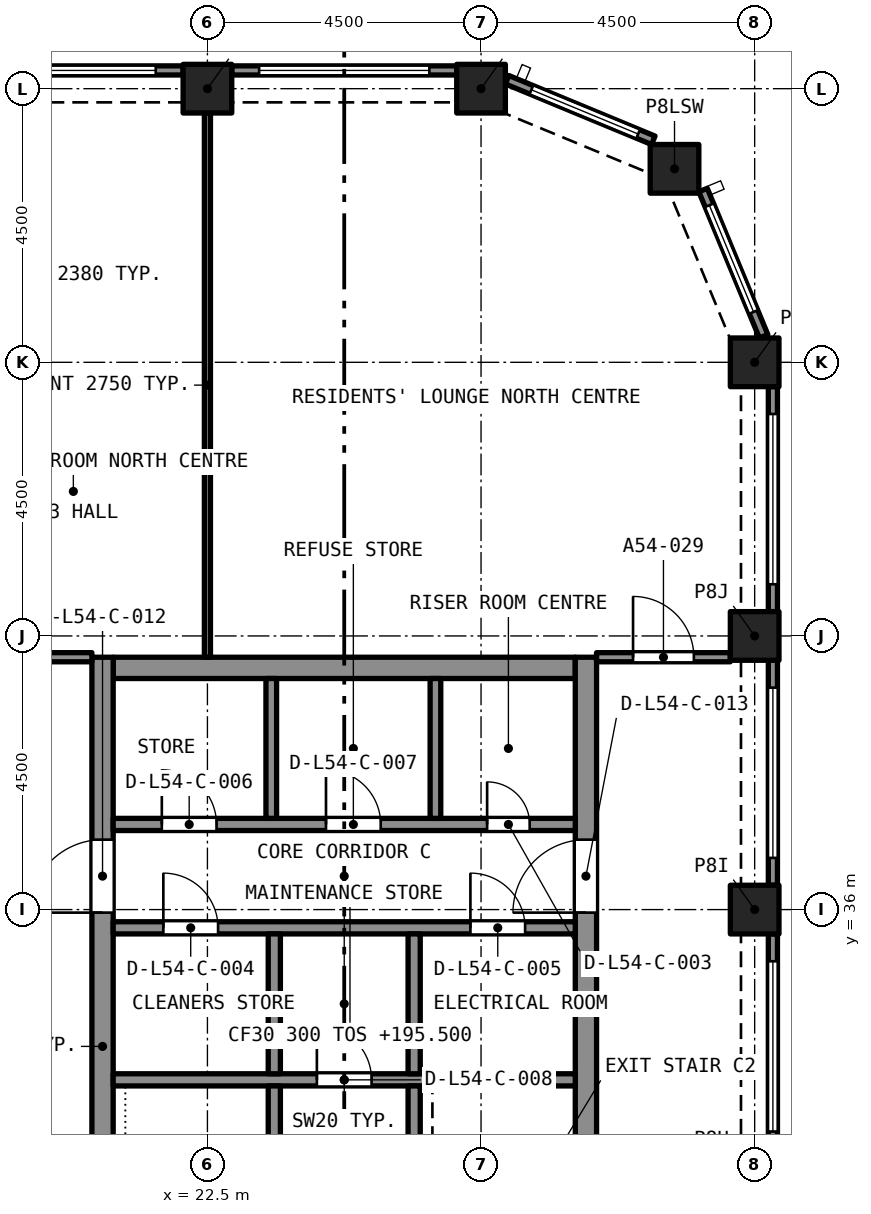
"""IFC4 building model, lengths in metres.
Left out: names, types, materials, properties, quantities, classifications, styles, units other than length and angle.
Written with IfcOpenShell. Run it as: python <this file> out.ifc"""

import sys

from ifc_helpers import new_model, si_unit, direction, frame, frame_2d, origin, origin_2d, place, context, subcontext, project, spatial, rectangle, extrude, element, fill, save


model = new_model("IFC4")
c1 = context("Model", 3, precision=1e-05, world=origin(), true_north=direction((0.0, 1.0)))
c2 = subcontext(c1, "Body", "Model", "MODEL_VIEW")
j1 = project(units=[si_unit("LENGTHUNIT", "METRE"), si_unit("PLANEANGLEUNIT", "RADIAN")], contexts=[c1])
p1 = place(None, origin())
s1 = spatial("IfcSite", under=j1, at=p1, CompositionType="ELEMENT")
p2 = place(p1, origin())
s2 = spatial("IfcBuilding", under=s1, at=p2, CompositionType="ELEMENT")
p3 = place(p2, frame((0.0, 0.0, 195.5)))
s3 = spatial("IfcBuildingStorey", under=s2, at=p3, CompositionType="ELEMENT", Elevation=195.5)
for number, where, z_axis, x_axis in (
    (1, (31.5, 36.0, 0.0), (0.0, 0.0, 1.0), (1.0, 0.0, 0.0)),
    (2, (31.5, 40.5, 0.0), (0.0, 0.0, 1.0), (1.0, 0.0, 0.0)),
    (3, (31.5, 45.0, 0.0), (0.0, 0.0, 1.0), (1.0, 0.0, 0.0)),
    (4, (30.182, 48.182, 0.0), (0.0, 0.0, 1.0), (1.0, 0.0, 0.0)),
    (5, (22.5, 49.5, 0.0), (0.0, 0.0, 1.0), (1.0, 0.0, 0.0)),
    (6, (27.0, 49.5, 0.0), (0.0, 0.0, 1.0), (1.0, 0.0, 0.0)),
):
    element("IfcColumn", number, at=place(p3, frame(where, z_axis=z_axis, x_axis=x_axis)), inside=s3, PredefinedType="COLUMN", context=c2, shape_type="SweptSolid", body=[
        extrude(rectangle(XDim=0.8, YDim=0.8, at=origin_2d()), origin(), (0.0, 0.0, 1.0), 3.2),
    ])
p4 = place(p3, frame((20.95, 39.975, 0.0), z_axis=(0.0, 0.0, 1.0), x_axis=(1.0, 0.0, 0.0)))
e7 = element("IfcWall", 7, at=p4, inside=s3, PredefinedType="SOLIDWALL", context=c2, shape_type="SweptSolid", body=[
    extrude(rectangle(XDim=7.6, YDim=0.35, at=frame_2d((3.8, 0.0))), origin(), (0.0, 0.0, 1.0), 3.2),
])
p5 = place(p3, frame((20.775, 27.35, 0.0), z_axis=(0.0, 0.0, 1.0), x_axis=(0.0, 1.0, 0.0)))
e8 = element("IfcWall", 8, at=p5, inside=s3, PredefinedType="SOLIDWALL", context=c2, shape_type="SweptSolid", body=[
    extrude(rectangle(XDim=12.8, YDim=0.35, at=frame_2d((6.4, 0.0))), origin(), (0.0, 0.0, 1.0), 3.2),
])
p6 = place(p5, frame((8.6, 0.0, 0.0)))
e9 = element("IfcOpeningElement", 9, at=p6, cuts=e8, PredefinedType="OPENING", context=c2, shape_type="SweptSolid", body=[
    extrude(rectangle(XDim=1.2, YDim=2.1, at=frame_2d((0.6, 1.05))), frame((0.0, 0.185, 0.0), z_axis=(0.0, -1.0, 0.0), x_axis=(1.0, 0.0, 0.0)), (0.0, 0.0, 1.0), 0.37),
])
p7 = place(p3, frame((28.725, 27.35, 0.0), z_axis=(0.0, 0.0, 1.0), x_axis=(0.0, 1.0, 0.0)))
e10 = element("IfcWall", 10, at=p7, inside=s3, PredefinedType="SOLIDWALL", context=c2, shape_type="SweptSolid", body=[
    extrude(rectangle(XDim=12.8, YDim=0.35, at=frame_2d((6.4, 0.0))), origin(), (0.0, 0.0, 1.0), 3.2),
])
p8 = place(p7, frame((8.6, 0.0, 0.0)))
e11 = element("IfcOpeningElement", 11, at=p8, cuts=e10, PredefinedType="OPENING", context=c2, shape_type="SweptSolid", body=[
    extrude(rectangle(XDim=1.2, YDim=2.1, at=frame_2d((0.6, 1.05))), frame((0.0, 0.185, 0.0), z_axis=(0.0, -1.0, 0.0), x_axis=(1.0, 0.0, 0.0)), (0.0, 0.0, 1.0), 0.37),
])
p9 = place(p3, frame((31.8, 35.6, 0.0), z_axis=(0.0, 0.0, 1.0), x_axis=(0.0, -1.0, 0.0)))
e12 = element("IfcWall", 12, at=p9, inside=s3, PredefinedType="SOLIDWALL", context=c2, shape_type="SweptSolid", body=[
    extrude(rectangle(XDim=3.7, YDim=0.15, at=frame_2d((1.85, 0.0))), origin(), (0.0, 0.0, 1.0), 3.2),
])
p10 = place(p9, frame((0.45, 0.0, 0.45)))
e13 = element("IfcOpeningElement", 13, at=p10, cuts=e12, PredefinedType="OPENING", context=c2, shape_type="SweptSolid", body=[
    extrude(rectangle(XDim=2.8, YDim=1.95, at=frame_2d((1.4, 0.975))), frame((0.0, 0.085, 0.0), z_axis=(0.0, -1.0, 0.0), x_axis=(1.0, 0.0, 0.0)), (0.0, 0.0, 1.0), 0.17),
])
p11 = place(p3, frame((31.8, 40.1, 0.0), z_axis=(0.0, 0.0, 1.0), x_axis=(0.0, -1.0, 0.0)))
e14 = element("IfcWall", 14, at=p11, inside=s3, PredefinedType="SOLIDWALL", context=c2, shape_type="SweptSolid", body=[
    extrude(rectangle(XDim=3.7, YDim=0.15, at=frame_2d((1.85, 0.0))), origin(), (0.0, 0.0, 1.0), 3.2),
])
p12 = place(p11, frame((0.45, 0.0, 0.45)))
e15 = element("IfcOpeningElement", 15, at=p12, cuts=e14, PredefinedType="OPENING", context=c2, shape_type="SweptSolid", body=[
    extrude(rectangle(XDim=2.8, YDim=1.95, at=frame_2d((1.4, 0.975))), frame((0.0, 0.085, 0.0), z_axis=(0.0, -1.0, 0.0), x_axis=(1.0, 0.0, 0.0)), (0.0, 0.0, 1.0), 0.17),
])
p13 = place(p3, frame((31.8, 44.6, 0.0), z_axis=(0.0, 0.0, 1.0), x_axis=(0.0, -1.0, 0.0)))
e16 = element("IfcWall", 16, at=p13, inside=s3, PredefinedType="SOLIDWALL", context=c2, shape_type="SweptSolid", body=[
    extrude(rectangle(XDim=3.7, YDim=0.15, at=frame_2d((1.85, 0.0))), origin(), (0.0, 0.0, 1.0), 3.2),
])
p14 = place(p13, frame((0.45, 0.0, 0.45)))
e17 = element("IfcOpeningElement", 17, at=p14, cuts=e16, PredefinedType="OPENING", context=c2, shape_type="SweptSolid", body=[
    extrude(rectangle(XDim=2.8, YDim=1.95, at=frame_2d((1.4, 0.975))), frame((0.0, 0.085, 0.0), z_axis=(0.0, -1.0, 0.0), x_axis=(1.0, 0.0, 0.0)), (0.0, 0.0, 1.0), 0.17),
])
p15 = place(p3, frame((30.651, 47.833, 0.0), z_axis=(0.0, 0.0, 1.0), x_axis=(0.382669406082, -0.923885342263, 0.0)))
e18 = element("IfcWall", 18, at=p15, inside=s3, PredefinedType="SOLIDWALL", context=c2, shape_type="SweptSolid", body=[
    extrude(rectangle(XDim=2.602, YDim=0.15, at=frame_2d((1.301, 0.0))), origin(), (0.0, 0.0, 1.0), 3.2),
])
p16 = place(p15, frame((0.27, 0.0, 0.45)))
e19 = element("IfcOpeningElement", 19, at=p16, cuts=e18, PredefinedType="OPENING", context=c2, shape_type="SweptSolid", body=[
    extrude(rectangle(XDim=1.9, YDim=1.95, at=frame_2d((0.95, 0.975))), frame((0.0, 0.085, 0.0), z_axis=(0.0, -1.0, 0.0), x_axis=(1.0, 0.0, 0.0)), (0.0, 0.0, 1.0), 0.17),
])
p17 = place(p3, frame((27.429, 49.647, 0.0), z_axis=(0.0, 0.0, 1.0), x_axis=(0.923885342263, -0.382669406082, 0.0)))
e20 = element("IfcWall", 20, at=p17, inside=s3, PredefinedType="SOLIDWALL", context=c2, shape_type="SweptSolid", body=[
    extrude(rectangle(XDim=2.602, YDim=0.15, at=frame_2d((1.301, 0.0))), origin(), (0.0, 0.0, 1.0), 3.2),
])
p18 = place(p17, frame((0.432, 0.0, 0.45)))
e21 = element("IfcOpeningElement", 21, at=p18, cuts=e20, PredefinedType="OPENING", context=c2, shape_type="SweptSolid", body=[
    extrude(rectangle(XDim=1.9, YDim=1.95, at=frame_2d((0.95, 0.975))), frame((0.0, 0.085, 0.0), z_axis=(0.0, -1.0, 0.0), x_axis=(1.0, 0.0, 0.0)), (0.0, 0.0, 1.0), 0.17),
])
p19 = place(p3, frame((22.9, 49.8, 0.0), z_axis=(0.0, 0.0, 1.0), x_axis=(1.0, 0.0, 0.0)))
e22 = element("IfcWall", 22, at=p19, inside=s3, PredefinedType="SOLIDWALL", context=c2, shape_type="SweptSolid", body=[
    extrude(rectangle(XDim=3.7, YDim=0.15, at=frame_2d((1.85, 0.0))), origin(), (0.0, 0.0, 1.0), 3.2),
])
p20 = place(p19, frame((0.45, 0.0, 0.45)))
e23 = element("IfcOpeningElement", 23, at=p20, cuts=e22, PredefinedType="OPENING", context=c2, shape_type="SweptSolid", body=[
    extrude(rectangle(XDim=2.8, YDim=1.95, at=frame_2d((1.4, 0.975))), frame((0.0, 0.085, 0.0), z_axis=(0.0, -1.0, 0.0), x_axis=(1.0, 0.0, 0.0)), (0.0, 0.0, 1.0), 0.17),
])
p21 = place(p3, frame((18.4, 49.8, 0.0), z_axis=(0.0, 0.0, 1.0), x_axis=(1.0, 0.0, 0.0)))
e24 = element("IfcWall", 24, at=p21, inside=s3, PredefinedType="SOLIDWALL", context=c2, shape_type="SweptSolid", body=[
    extrude(rectangle(XDim=3.7, YDim=0.15, at=frame_2d((1.85, 0.0))), origin(), (0.0, 0.0, 1.0), 3.2),
])
p22 = place(p21, frame((0.45, 0.0, 0.45)))
e25 = element("IfcOpeningElement", 25, at=p22, cuts=e24, PredefinedType="OPENING", context=c2, shape_type="SweptSolid", body=[
    extrude(rectangle(XDim=2.8, YDim=1.95, at=frame_2d((1.4, 0.975))), frame((0.0, 0.085, 0.0), z_axis=(0.0, -1.0, 0.0), x_axis=(1.0, 0.0, 0.0)), (0.0, 0.0, 1.0), 0.17),
])
p23 = place(p3, frame((18.4, 40.15, 0.0), z_axis=(0.0, 0.0, 1.0), x_axis=(1.0, 0.0, 0.0)))
e26 = element("IfcWall", 26, at=p23, inside=s3, PredefinedType="PARTITIONING", context=c2, shape_type="SweptSolid", body=[
    extrude(rectangle(XDim=2.2, YDim=0.15, at=frame_2d((1.1, 0.0))), origin(), (0.0, 0.0, 1.0), 2.75),
])
p24 = place(p23, frame((0.2, 0.0, 0.0)))
e27 = element("IfcOpeningElement", 27, at=p24, cuts=e26, PredefinedType="OPENING", context=c2, shape_type="SweptSolid", body=[
    extrude(rectangle(XDim=1.0, YDim=2.1, at=frame_2d((0.5, 1.05))), frame((0.0, 0.085, 0.0), z_axis=(0.0, -1.0, 0.0), x_axis=(1.0, 0.0, 0.0)), (0.0, 0.0, 1.0), 0.17),
])
p25 = place(p3, frame((28.9, 40.15, 0.0), z_axis=(0.0, 0.0, 1.0), x_axis=(1.0, 0.0, 0.0)))
e28 = element("IfcWall", 28, at=p25, inside=s3, PredefinedType="PARTITIONING", context=c2, shape_type="SweptSolid", body=[
    extrude(rectangle(XDim=2.2, YDim=0.15, at=frame_2d((1.1, 0.0))), origin(), (0.0, 0.0, 1.0), 2.75),
])
p26 = place(p25, frame((0.6, 0.0, 0.0)))
e29 = element("IfcOpeningElement", 29, at=p26, cuts=e28, PredefinedType="OPENING", context=c2, shape_type="SweptSolid", body=[
    extrude(rectangle(XDim=1.0, YDim=2.1, at=frame_2d((0.5, 1.05))), frame((0.0, 0.085, 0.0), z_axis=(0.0, -1.0, 0.0), x_axis=(1.0, 0.0, 0.0)), (0.0, 0.0, 1.0), 0.17),
])
p27 = place(p3, frame((22.5, 40.15, 0.0), z_axis=(0.0, 0.0, 1.0), x_axis=(0.0, 1.0, 0.0)))
e30 = element("IfcWall", 30, at=p27, inside=s3, PredefinedType="PARTITIONING", context=c2, shape_type="SweptSolid", body=[
    extrude(rectangle(XDim=8.95, YDim=0.1, at=frame_2d((4.475, 0.0))), origin(), (0.0, 0.0, 1.0), 2.75),
])
p28 = place(p3, frame((20.95, 33.2, 0.0), z_axis=(0.0, 0.0, 1.0), x_axis=(1.0, 0.0, 0.0)))
e31 = element("IfcWall", 31, at=p28, inside=s3, PredefinedType="SOLIDWALL", context=c2, shape_type="SweptSolid", body=[
    extrude(rectangle(XDim=7.6, YDim=0.2, at=frame_2d((3.8, 0.0))), origin(), (0.0, 0.0, 1.0), 2.9),
])
p29 = place(p28, frame((3.35, 0.0, 0.0)))
e32 = element("IfcOpeningElement", 32, at=p29, cuts=e31, PredefinedType="OPENING", context=c2, shape_type="SweptSolid", body=[
    extrude(rectangle(XDim=0.9, YDim=2.1, at=frame_2d((0.45, 1.05))), frame((0.0, 0.11, 0.0), z_axis=(0.0, -1.0, 0.0), x_axis=(1.0, 0.0, 0.0)), (0.0, 0.0, 1.0), 0.22),
])
p30 = place(p3, frame((20.95, 35.7, 0.0), z_axis=(0.0, 0.0, 1.0), x_axis=(1.0, 0.0, 0.0)))
e33 = element("IfcWall", 33, at=p30, inside=s3, PredefinedType="SOLIDWALL", context=c2, shape_type="SweptSolid", body=[
    extrude(rectangle(XDim=7.6, YDim=0.2, at=frame_2d((3.8, 0.0))), origin(), (0.0, 0.0, 1.0), 2.9),
])
p31 = place(p30, frame((0.825, 0.0, 0.0)))
e34 = element("IfcOpeningElement", 34, at=p31, cuts=e33, PredefinedType="OPENING", context=c2, shape_type="SweptSolid", body=[
    extrude(rectangle(XDim=0.9, YDim=2.1, at=frame_2d((0.45, 1.05))), frame((0.0, 0.11, 0.0), z_axis=(0.0, -1.0, 0.0), x_axis=(1.0, 0.0, 0.0)), (0.0, 0.0, 1.0), 0.22),
])
p32 = place(p30, frame((5.875, 0.0, 0.0)))
e35 = element("IfcOpeningElement", 35, at=p32, cuts=e33, PredefinedType="OPENING", context=c2, shape_type="SweptSolid", body=[
    extrude(rectangle(XDim=0.9, YDim=2.1, at=frame_2d((0.45, 1.05))), frame((0.0, 0.11, 0.0), z_axis=(0.0, -1.0, 0.0), x_axis=(1.0, 0.0, 0.0)), (0.0, 0.0, 1.0), 0.22),
])
p33 = place(p3, frame((20.95, 37.4, 0.0), z_axis=(0.0, 0.0, 1.0), x_axis=(1.0, 0.0, 0.0)))
e36 = element("IfcWall", 36, at=p33, inside=s3, PredefinedType="SOLIDWALL", context=c2, shape_type="SweptSolid", body=[
    extrude(rectangle(XDim=7.6, YDim=0.2, at=frame_2d((3.8, 0.0))), origin(), (0.0, 0.0, 1.0), 2.9),
])
p34 = place(p33, frame((6.15, 0.0, 0.0)))
e37 = element("IfcOpeningElement", 37, at=p34, cuts=e36, PredefinedType="OPENING", context=c2, shape_type="SweptSolid", body=[
    extrude(rectangle(XDim=0.7, YDim=2.1, at=frame_2d((0.35, 1.05))), frame((0.0, 0.11, 0.0), z_axis=(0.0, -1.0, 0.0), x_axis=(1.0, 0.0, 0.0)), (0.0, 0.0, 1.0), 0.22),
])
p35 = place(p33, frame((0.8, 0.0, 0.0)))
e38 = element("IfcOpeningElement", 38, at=p35, cuts=e36, PredefinedType="OPENING", context=c2, shape_type="SweptSolid", body=[
    extrude(rectangle(XDim=0.9, YDim=2.1, at=frame_2d((0.45, 1.05))), frame((0.0, 0.11, 0.0), z_axis=(0.0, -1.0, 0.0), x_axis=(1.0, 0.0, 0.0)), (0.0, 0.0, 1.0), 0.22),
])
p36 = place(p33, frame((3.5, 0.0, 0.0)))
e39 = element("IfcOpeningElement", 39, at=p36, cuts=e36, PredefinedType="OPENING", context=c2, shape_type="SweptSolid", body=[
    extrude(rectangle(XDim=0.9, YDim=2.1, at=frame_2d((0.45, 1.05))), frame((0.0, 0.11, 0.0), z_axis=(0.0, -1.0, 0.0), x_axis=(1.0, 0.0, 0.0)), (0.0, 0.0, 1.0), 0.22),
])
p37 = place(p3, frame((23.6, 27.7, 0.0), z_axis=(0.0, 0.0, 1.0), x_axis=(0.0, 1.0, 0.0)))
e40 = element("IfcWall", 40, at=p37, inside=s3, PredefinedType="SOLIDWALL", context=c2, shape_type="SweptSolid", body=[
    extrude(rectangle(XDim=5.4, YDim=0.2, at=frame_2d((2.7, 0.0))), origin(), (0.0, 0.0, 1.0), 2.9),
])
p38 = place(p37, frame((0.2, 0.0, 0.0)))
e41 = element("IfcOpeningElement", 41, at=p38, cuts=e40, PredefinedType="OPENING", context=c2, shape_type="SweptSolid", body=[
    extrude(rectangle(XDim=0.9, YDim=2.1, at=frame_2d((0.45, 1.05))), frame((0.0, 0.11, 0.0), z_axis=(0.0, -1.0, 0.0), x_axis=(1.0, 0.0, 0.0)), (0.0, 0.0, 1.0), 0.22),
])
p39 = place(p3, frame((25.9, 27.7, 0.0), z_axis=(0.0, 0.0, 1.0), x_axis=(0.0, 1.0, 0.0)))
e42 = element("IfcWall", 42, at=p39, inside=s3, PredefinedType="SOLIDWALL", context=c2, shape_type="SweptSolid", body=[
    extrude(rectangle(XDim=5.4, YDim=0.2, at=frame_2d((2.7, 0.0))), origin(), (0.0, 0.0, 1.0), 2.9),
])
p40 = place(p39, frame((0.2, 0.0, 0.0)))
e43 = element("IfcOpeningElement", 43, at=p40, cuts=e42, PredefinedType="OPENING", context=c2, shape_type="SweptSolid", body=[
    extrude(rectangle(XDim=0.9, YDim=2.1, at=frame_2d((0.45, 1.05))), frame((0.0, 0.11, 0.0), z_axis=(0.0, -1.0, 0.0), x_axis=(1.0, 0.0, 0.0)), (0.0, 0.0, 1.0), 0.22),
])
for number, where, z_axis, x_axis in (
    (44, (23.6, 33.3, 0.0), (0.0, 0.0, 1.0), (0.0, 1.0, 0.0)),
    (45, (25.9, 33.3, 0.0), (0.0, 0.0, 1.0), (0.0, 1.0, 0.0)),
):
    element("IfcWall", number, at=place(p3, frame(where, z_axis=z_axis, x_axis=x_axis)), inside=s3, PredefinedType="SOLIDWALL", context=c2, shape_type="SweptSolid", body=[
        extrude(rectangle(XDim=2.3, YDim=0.2, at=frame_2d((1.15, 0.0))), origin(), (0.0, 0.0, 1.0), 2.9),
    ])
for number, where, z_axis, x_axis in (
    (46, (23.55, 37.5, 0.0), (0.0, 0.0, 1.0), (0.0, 1.0, 0.0)),
    (47, (26.25, 37.5, 0.0), (0.0, 0.0, 1.0), (0.0, 1.0, 0.0)),
):
    element("IfcWall", number, at=place(p3, frame(where, z_axis=z_axis, x_axis=x_axis)), inside=s3, PredefinedType="SOLIDWALL", context=c2, shape_type="SweptSolid", body=[
        extrude(rectangle(XDim=2.3, YDim=0.175, at=frame_2d((1.15, 0.0))), origin(), (0.0, 0.0, 1.0), 2.9),
    ])
p41 = place(p10, origin())
e48 = element("IfcWindow", 48, at=p41, inside=s3, PartitioningType="SINGLE_PANEL", PredefinedType="WINDOW", context=c2, shape_type="SweptSolid", body=[
    extrude(rectangle(XDim=2.8, YDim=1.95, at=frame_2d((1.4, 0.975))), frame((0.0, 0.03, 0.0), z_axis=(0.0, -1.0, 0.0), x_axis=(1.0, 0.0, 0.0)), (0.0, 0.0, 1.0), 0.06),
])
fill(e13, e48)
p42 = place(p12, origin())
e49 = element("IfcWindow", 49, at=p42, inside=s3, PartitioningType="SINGLE_PANEL", PredefinedType="WINDOW", context=c2, shape_type="SweptSolid", body=[
    extrude(rectangle(XDim=2.8, YDim=1.95, at=frame_2d((1.4, 0.975))), frame((0.0, 0.03, 0.0), z_axis=(0.0, -1.0, 0.0), x_axis=(1.0, 0.0, 0.0)), (0.0, 0.0, 1.0), 0.06),
])
fill(e15, e49)
p43 = place(p14, origin())
e50 = element("IfcWindow", 50, at=p43, inside=s3, PartitioningType="SINGLE_PANEL", PredefinedType="WINDOW", context=c2, shape_type="SweptSolid", body=[
    extrude(rectangle(XDim=2.8, YDim=1.95, at=frame_2d((1.4, 0.975))), frame((0.0, 0.03, 0.0), z_axis=(0.0, -1.0, 0.0), x_axis=(1.0, 0.0, 0.0)), (0.0, 0.0, 1.0), 0.06),
])
fill(e17, e50)
p44 = place(p16, origin())
e51 = element("IfcWindow", 51, at=p44, inside=s3, PartitioningType="SINGLE_PANEL", PredefinedType="WINDOW", context=c2, shape_type="SweptSolid", body=[
    extrude(rectangle(XDim=1.9, YDim=1.95, at=frame_2d((0.95, 0.975))), frame((0.0, 0.03, 0.0), z_axis=(0.0, -1.0, 0.0), x_axis=(1.0, 0.0, 0.0)), (0.0, 0.0, 1.0), 0.06),
])
fill(e19, e51)
p45 = place(p18, origin())
e52 = element("IfcWindow", 52, at=p45, inside=s3, PartitioningType="SINGLE_PANEL", PredefinedType="WINDOW", context=c2, shape_type="SweptSolid", body=[
    extrude(rectangle(XDim=1.9, YDim=1.95, at=frame_2d((0.95, 0.975))), frame((0.0, 0.03, 0.0), z_axis=(0.0, -1.0, 0.0), x_axis=(1.0, 0.0, 0.0)), (0.0, 0.0, 1.0), 0.06),
])
fill(e21, e52)
p46 = place(p20, origin())
e53 = element("IfcWindow", 53, at=p46, inside=s3, PartitioningType="SINGLE_PANEL", PredefinedType="WINDOW", context=c2, shape_type="SweptSolid", body=[
    extrude(rectangle(XDim=2.8, YDim=1.95, at=frame_2d((1.4, 0.975))), frame((0.0, 0.03, 0.0), z_axis=(0.0, -1.0, 0.0), x_axis=(1.0, 0.0, 0.0)), (0.0, 0.0, 1.0), 0.06),
])
fill(e23, e53)
p47 = place(p22, origin())
e54 = element("IfcWindow", 54, at=p47, inside=s3, PartitioningType="SINGLE_PANEL", PredefinedType="WINDOW", context=c2, shape_type="SweptSolid", body=[
    extrude(rectangle(XDim=2.8, YDim=1.95, at=frame_2d((1.4, 0.975))), frame((0.0, 0.03, 0.0), z_axis=(0.0, -1.0, 0.0), x_axis=(1.0, 0.0, 0.0)), (0.0, 0.0, 1.0), 0.06),
])
fill(e25, e54)
p48 = place(p26, origin())
e55 = element("IfcDoor", 55, at=p48, inside=s3, OperationType="SINGLE_SWING_RIGHT", PredefinedType="DOOR", context=c2, shape_type="SweptSolid", body=[
    extrude(rectangle(XDim=1.0, YDim=2.1, at=frame_2d((0.5, 1.05))), frame((0.0, 0.025, 0.0), z_axis=(0.0, -1.0, 0.0), x_axis=(1.0, 0.0, 0.0)), (0.0, 0.0, 1.0), 0.05),
])
fill(e29, e55)
p49 = place(p34, origin())
e56 = element("IfcDoor", 56, at=p49, inside=s3, OperationType="SINGLE_SWING_LEFT", PredefinedType="DOOR", context=c2, shape_type="SweptSolid", body=[
    extrude(rectangle(XDim=0.7, YDim=2.1, at=frame_2d((0.35, 1.05))), frame((0.0, 0.025, 0.0), z_axis=(0.0, -1.0, 0.0), x_axis=(1.0, 0.0, 0.0)), (0.0, 0.0, 1.0), 0.05),
])
fill(e37, e56)
p50 = place(p31, origin())
e57 = element("IfcDoor", 57, at=p50, inside=s3, OperationType="SINGLE_SWING_LEFT", PredefinedType="DOOR", context=c2, shape_type="SweptSolid", body=[
    extrude(rectangle(XDim=0.9, YDim=2.1, at=frame_2d((0.45, 1.05))), frame((0.0, 0.025, 0.0), z_axis=(0.0, -1.0, 0.0), x_axis=(1.0, 0.0, 0.0)), (0.0, 0.0, 1.0), 0.05),
])
fill(e34, e57)
p51 = place(p32, origin())
e58 = element("IfcDoor", 58, at=p51, inside=s3, OperationType="SINGLE_SWING_LEFT", PredefinedType="DOOR", context=c2, shape_type="SweptSolid", body=[
    extrude(rectangle(XDim=0.9, YDim=2.1, at=frame_2d((0.45, 1.05))), frame((0.0, 0.025, 0.0), z_axis=(0.0, -1.0, 0.0), x_axis=(1.0, 0.0, 0.0)), (0.0, 0.0, 1.0), 0.05),
])
fill(e35, e58)
p52 = place(p35, origin())
e59 = element("IfcDoor", 59, at=p52, inside=s3, OperationType="SINGLE_SWING_LEFT", PredefinedType="DOOR", context=c2, shape_type="SweptSolid", body=[
    extrude(rectangle(XDim=0.9, YDim=2.1, at=frame_2d((0.45, 1.05))), frame((0.0, 0.025, 0.0), z_axis=(0.0, -1.0, 0.0), x_axis=(1.0, 0.0, 0.0)), (0.0, 0.0, 1.0), 0.05),
])
fill(e38, e59)
p53 = place(p36, origin())
e60 = element("IfcDoor", 60, at=p53, inside=s3, OperationType="SINGLE_SWING_LEFT", PredefinedType="DOOR", context=c2, shape_type="SweptSolid", body=[
    extrude(rectangle(XDim=0.9, YDim=2.1, at=frame_2d((0.45, 1.05))), frame((0.0, 0.025, 0.0), z_axis=(0.0, -1.0, 0.0), x_axis=(1.0, 0.0, 0.0)), (0.0, 0.0, 1.0), 0.05),
])
fill(e39, e60)
p54 = place(p29, origin())
e61 = element("IfcDoor", 61, at=p54, inside=s3, OperationType="SINGLE_SWING_LEFT", PredefinedType="DOOR", context=c2, shape_type="SweptSolid", body=[
    extrude(rectangle(XDim=0.9, YDim=2.1, at=frame_2d((0.45, 1.05))), frame((0.0, 0.025, 0.0), z_axis=(0.0, -1.0, 0.0), x_axis=(1.0, 0.0, 0.0)), (0.0, 0.0, 1.0), 0.05),
])
fill(e32, e61)
p55 = place(p6, origin())
e62 = element("IfcDoor", 62, at=p55, inside=s3, OperationType="SINGLE_SWING_LEFT", PredefinedType="DOOR", context=c2, shape_type="SweptSolid", body=[
    extrude(rectangle(XDim=1.2, YDim=2.1, at=frame_2d((0.6, 1.05))), frame((0.0, 0.025, 0.0), z_axis=(0.0, -1.0, 0.0), x_axis=(1.0, 0.0, 0.0)), (0.0, 0.0, 1.0), 0.05),
])
fill(e9, e62)
p56 = place(p8, origin())
e63 = element("IfcDoor", 63, at=p56, inside=s3, OperationType="SINGLE_SWING_LEFT", PredefinedType="DOOR", context=c2, shape_type="SweptSolid", body=[
    extrude(rectangle(XDim=1.2, YDim=2.1, at=frame_2d((0.6, 1.05))), frame((0.0, 0.025, 0.0), z_axis=(0.0, -1.0, 0.0), x_axis=(1.0, 0.0, 0.0)), (0.0, 0.0, 1.0), 0.05),
])
fill(e11, e63)
save(model, sys.argv[1])
